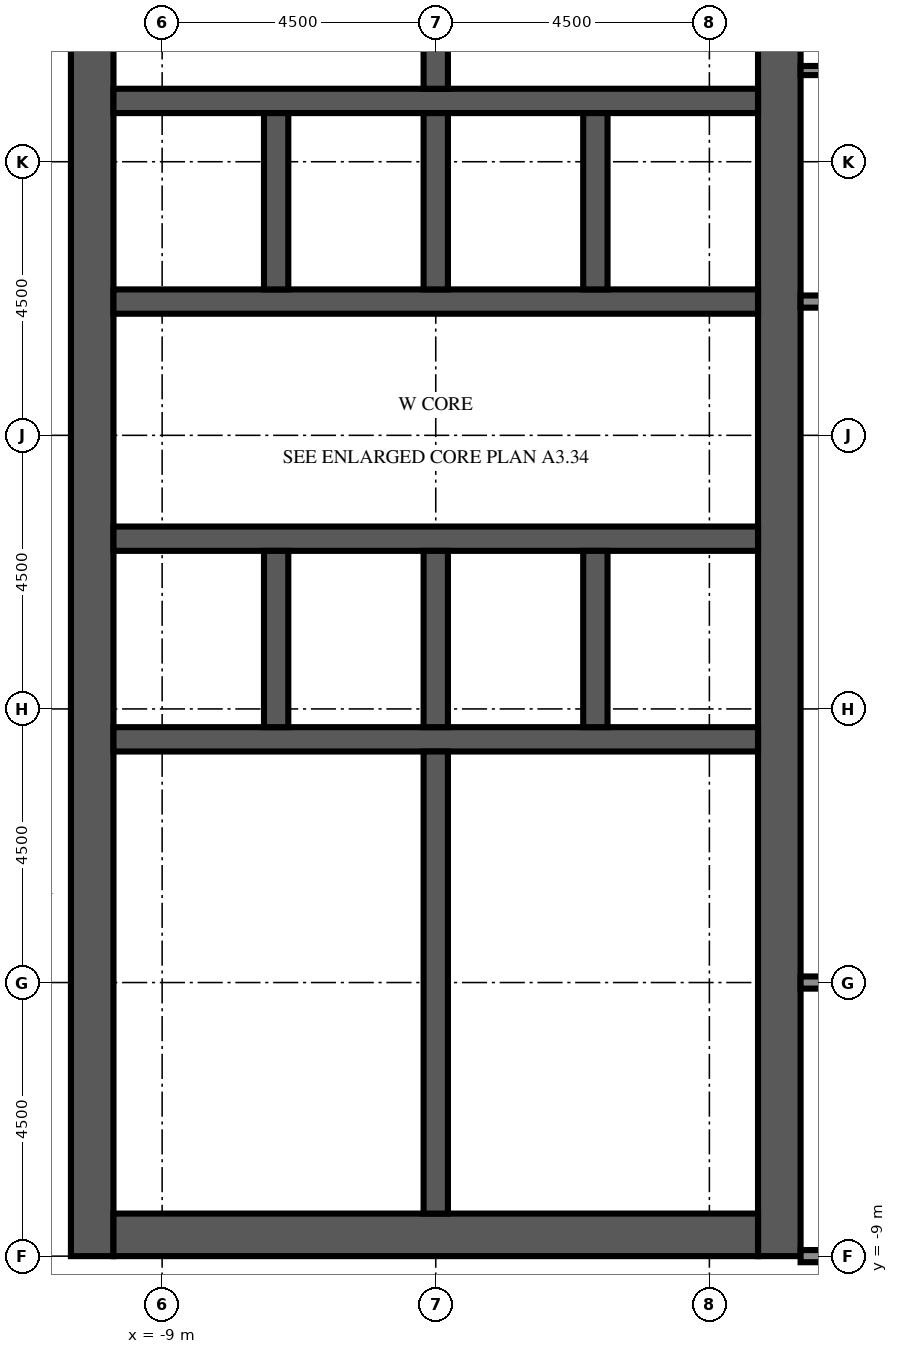
"""IFC4 building model, lengths in metres.
Left out: names, types, materials, properties, quantities, classifications, styles, units other than length and angle.
Written with IfcOpenShell. Run it as: python <this file> out.ifc"""

import sys

from ifc_helpers import new_model, si_unit, direction, frame, frame_2d, origin, place, context, subcontext, project, spatial, rectangle, extrude, element, fill, save


model = new_model("IFC4")
c1 = context("Model", 3, precision=1e-05, world=origin(), true_north=direction((0.0, 1.0)))
c2 = subcontext(c1, "Body", "Model", "MODEL_VIEW")
j1 = project(units=[si_unit("LENGTHUNIT", "METRE"), si_unit("PLANEANGLEUNIT", "RADIAN")], contexts=[c1])
p1 = place(None, origin())
s1 = spatial("IfcSite", under=j1, at=p1, CompositionType="ELEMENT")
p2 = place(p1, origin())
s2 = spatial("IfcBuilding", under=s1, at=p2, CompositionType="ELEMENT")
p3 = place(p2, frame((0.0, 0.0, 226.2)))
s3 = spatial("IfcBuildingStorey", under=s2, at=p3, CompositionType="ELEMENT", Elevation=226.2)
p4 = place(p3, frame((-10.15, -9.0, 0.0), z_axis=(0.0, 0.0, 1.0), x_axis=(0.0, 1.0, 0.0)))
e1 = element("IfcWall", 1, at=p4, inside=s3, PredefinedType="SHEAR", context=c2, shape_type="SweptSolid", body=[
    extrude(rectangle(XDim=27.5, YDim=0.7, at=frame_2d((13.75, 0.0))), origin(), (0.0, 0.0, 1.0), 5.4),
])
p5 = place(p4, frame((12.55, 0.0, 0.0)))
e2 = element("IfcOpeningElement", 2, at=p5, cuts=e1, PredefinedType="OPENING", context=c2, shape_type="SweptSolid", body=[
    extrude(rectangle(XDim=2.4, YDim=2.4, at=frame_2d((1.2, 1.2))), frame((0.0, 0.36, 0.0), z_axis=(0.0, -1.0, 0.0), x_axis=(1.0, 0.0, 0.0)), (0.0, 0.0, 1.0), 0.72),
])
p6 = place(p4, frame((6.825, 0.0, 0.0)))
e3 = element("IfcOpeningElement", 3, at=p6, cuts=e1, PredefinedType="OPENING", context=c2, shape_type="SweptSolid", body=[
    extrude(rectangle(XDim=1.2, YDim=2.1, at=frame_2d((0.6, 1.05))), frame((0.0, 0.36, 0.0), z_axis=(0.0, -1.0, 0.0), x_axis=(1.0, 0.0, 0.0)), (0.0, 0.0, 1.0), 0.72),
])
p7 = place(p4, frame((19.475, 0.0, 0.0)))
e4 = element("IfcOpeningElement", 4, at=p7, cuts=e1, PredefinedType="OPENING", context=c2, shape_type="SweptSolid", body=[
    extrude(rectangle(XDim=1.2, YDim=2.1, at=frame_2d((0.6, 1.05))), frame((0.0, 0.36, 0.0), z_axis=(0.0, -1.0, 0.0), x_axis=(1.0, 0.0, 0.0)), (0.0, 0.0, 1.0), 0.72),
])
p8 = place(p3, frame((1.15, -9.0, 0.0), z_axis=(0.0, 0.0, 1.0), x_axis=(0.0, 1.0, 0.0)))
e5 = element("IfcWall", 5, at=p8, inside=s3, PredefinedType="SHEAR", context=c2, shape_type="SweptSolid", body=[
    extrude(rectangle(XDim=27.5, YDim=0.7, at=frame_2d((13.75, 0.0))), origin(), (0.0, 0.0, 1.0), 5.4),
])
p9 = place(p8, frame((12.55, 0.0, 0.0)))
e6 = element("IfcOpeningElement", 6, at=p9, cuts=e5, PredefinedType="OPENING", context=c2, shape_type="SweptSolid", body=[
    extrude(rectangle(XDim=2.4, YDim=2.4, at=frame_2d((1.2, 1.2))), frame((0.0, 0.36, 0.0), z_axis=(0.0, -1.0, 0.0), x_axis=(1.0, 0.0, 0.0)), (0.0, 0.0, 1.0), 0.72),
])
p10 = place(p8, frame((5.46, 0.0, 0.0)))
e7 = element("IfcOpeningElement", 7, at=p10, cuts=e5, PredefinedType="OPENING", context=c2, shape_type="SweptSolid", body=[
    extrude(rectangle(XDim=0.968, YDim=2.1, at=frame_2d((0.484, 1.05))), frame((0.0, 0.36, 0.0), z_axis=(0.0, -1.0, 0.0), x_axis=(1.0, 0.0, 0.0)), (0.0, 0.0, 1.0), 0.72),
])
p11 = place(p8, frame((23.54, 0.0, 0.0)))
e8 = element("IfcOpeningElement", 8, at=p11, cuts=e5, PredefinedType="OPENING", context=c2, shape_type="SweptSolid", body=[
    extrude(rectangle(XDim=1.2, YDim=2.1, at=frame_2d((0.6, 1.05))), frame((0.0, 0.36, 0.0), z_axis=(0.0, -1.0, 0.0), x_axis=(1.0, 0.0, 0.0)), (0.0, 0.0, 1.0), 0.72),
])
p12 = place(p3, frame((-9.8, -8.65, 0.0), z_axis=(0.0, 0.0, 1.0), x_axis=(1.0, 0.0, 0.0)))
e9 = element("IfcWall", 9, at=p12, inside=s3, PredefinedType="SHEAR", context=c2, shape_type="SweptSolid", body=[
    extrude(rectangle(XDim=10.6, YDim=0.7, at=frame_2d((5.3, 0.0))), origin(), (0.0, 0.0, 1.0), 5.4),
])
p13 = place(p3, frame((-9.8, -0.5, 0.0), z_axis=(0.0, 0.0, 1.0), x_axis=(1.0, 0.0, 0.0)))
e10 = element("IfcWall", 10, at=p13, inside=s3, PredefinedType="SHEAR", context=c2, shape_type="SweptSolid", body=[
    extrude(rectangle(XDim=10.6, YDim=0.4, at=frame_2d((5.3, 0.0))), origin(), (0.0, 0.0, 1.0), 5.4),
])
p14 = place(p3, frame((-9.8, 2.8, 0.0), z_axis=(0.0, 0.0, 1.0), x_axis=(1.0, 0.0, 0.0)))
e11 = element("IfcWall", 11, at=p14, inside=s3, PredefinedType="SHEAR", context=c2, shape_type="SweptSolid", body=[
    extrude(rectangle(XDim=10.6, YDim=0.4, at=frame_2d((5.3, 0.0))), origin(), (0.0, 0.0, 1.0), 5.4),
])
p15 = place(p14, frame((0.688, 0.0, 0.0)))
e12 = element("IfcOpeningElement", 12, at=p15, cuts=e11, PredefinedType="OPENING", context=c2, shape_type="SweptSolid", body=[
    extrude(rectangle(XDim=1.1, YDim=2.1, at=frame_2d((0.55, 1.05))), frame((0.0, 0.21, 0.0), z_axis=(0.0, -1.0, 0.0), x_axis=(1.0, 0.0, 0.0)), (0.0, 0.0, 1.0), 0.42),
])
p16 = place(p14, frame((3.438, 0.0, 0.0)))
e13 = element("IfcOpeningElement", 13, at=p16, cuts=e11, PredefinedType="OPENING", context=c2, shape_type="SweptSolid", body=[
    extrude(rectangle(XDim=1.1, YDim=2.1, at=frame_2d((0.55, 1.05))), frame((0.0, 0.21, 0.0), z_axis=(0.0, -1.0, 0.0), x_axis=(1.0, 0.0, 0.0)), (0.0, 0.0, 1.0), 0.42),
])
p17 = place(p14, frame((6.113, 0.0, 0.0)))
e14 = element("IfcOpeningElement", 14, at=p17, cuts=e11, PredefinedType="OPENING", context=c2, shape_type="SweptSolid", body=[
    extrude(rectangle(XDim=1.0, YDim=2.1, at=frame_2d((0.5, 1.05))), frame((0.0, 0.21, 0.0), z_axis=(0.0, -1.0, 0.0), x_axis=(1.0, 0.0, 0.0)), (0.0, 0.0, 1.0), 0.42),
])
p18 = place(p14, frame((8.863, 0.0, 0.0)))
e15 = element("IfcOpeningElement", 15, at=p18, cuts=e11, PredefinedType="OPENING", context=c2, shape_type="SweptSolid", body=[
    extrude(rectangle(XDim=1.0, YDim=2.1, at=frame_2d((0.5, 1.05))), frame((0.0, 0.21, 0.0), z_axis=(0.0, -1.0, 0.0), x_axis=(1.0, 0.0, 0.0)), (0.0, 0.0, 1.0), 0.42),
])
p19 = place(p3, frame((-9.8, 6.7, 0.0), z_axis=(0.0, 0.0, 1.0), x_axis=(1.0, 0.0, 0.0)))
e16 = element("IfcWall", 16, at=p19, inside=s3, PredefinedType="SHEAR", context=c2, shape_type="SweptSolid", body=[
    extrude(rectangle(XDim=10.6, YDim=0.4, at=frame_2d((5.3, 0.0))), origin(), (0.0, 0.0, 1.0), 5.4),
])
p20 = place(p19, frame((3.438, 0.0, 0.0)))
e17 = element("IfcOpeningElement", 17, at=p20, cuts=e16, PredefinedType="OPENING", context=c2, shape_type="SweptSolid", body=[
    extrude(rectangle(XDim=1.1, YDim=2.1, at=frame_2d((0.55, 1.05))), frame((0.0, 0.21, 0.0), z_axis=(0.0, -1.0, 0.0), x_axis=(1.0, 0.0, 0.0)), (0.0, 0.0, 1.0), 0.42),
])
p21 = place(p19, frame((6.062, 0.0, 0.0)))
e18 = element("IfcOpeningElement", 18, at=p21, cuts=e16, PredefinedType="OPENING", context=c2, shape_type="SweptSolid", body=[
    extrude(rectangle(XDim=1.1, YDim=2.1, at=frame_2d((0.55, 1.05))), frame((0.0, 0.21, 0.0), z_axis=(0.0, -1.0, 0.0), x_axis=(1.0, 0.0, 0.0)), (0.0, 0.0, 1.0), 0.42),
])
p22 = place(p19, frame((8.812, 0.0, 0.0)))
e19 = element("IfcOpeningElement", 19, at=p22, cuts=e16, PredefinedType="OPENING", context=c2, shape_type="SweptSolid", body=[
    extrude(rectangle(XDim=1.1, YDim=2.1, at=frame_2d((0.55, 1.05))), frame((0.0, 0.21, 0.0), z_axis=(0.0, -1.0, 0.0), x_axis=(1.0, 0.0, 0.0)), (0.0, 0.0, 1.0), 0.42),
])
p23 = place(p19, frame((0.738, 0.0, 0.0)))
e20 = element("IfcOpeningElement", 20, at=p23, cuts=e16, PredefinedType="OPENING", context=c2, shape_type="SweptSolid", body=[
    extrude(rectangle(XDim=1.0, YDim=2.1, at=frame_2d((0.5, 1.05))), frame((0.0, 0.21, 0.0), z_axis=(0.0, -1.0, 0.0), x_axis=(1.0, 0.0, 0.0)), (0.0, 0.0, 1.0), 0.42),
])
p24 = place(p3, frame((-9.8, 10.0, 0.0), z_axis=(0.0, 0.0, 1.0), x_axis=(1.0, 0.0, 0.0)))
e21 = element("IfcWall", 21, at=p24, inside=s3, PredefinedType="SHEAR", context=c2, shape_type="SweptSolid", body=[
    extrude(rectangle(XDim=10.6, YDim=0.4, at=frame_2d((5.3, 0.0))), origin(), (0.0, 0.0, 1.0), 5.4),
])
for number, where, z_axis, x_axis in (
    (22, (-7.125, -0.3, 0.0), (0.0, 0.0, 1.0), (0.0, 1.0, 0.0)),
    (23, (-7.125, 6.9, 0.0), (0.0, 0.0, 1.0), (0.0, 1.0, 0.0)),
    (24, (-4.5, -0.3, 0.0), (0.0, 0.0, 1.0), (0.0, 1.0, 0.0)),
    (25, (-4.5, 6.9, 0.0), (0.0, 0.0, 1.0), (0.0, 1.0, 0.0)),
    (26, (-1.875, -0.3, 0.0), (0.0, 0.0, 1.0), (0.0, 1.0, 0.0)),
    (27, (-1.875, 6.9, 0.0), (0.0, 0.0, 1.0), (0.0, 1.0, 0.0)),
):
    element("IfcWall", number, at=place(p3, frame(where, z_axis=z_axis, x_axis=x_axis)), inside=s3, PredefinedType="SHEAR", context=c2, shape_type="SweptSolid", body=[
        extrude(rectangle(XDim=2.9, YDim=0.4, at=frame_2d((1.45, 0.0))), origin(), (0.0, 0.0, 1.0), 5.4),
    ])
for number, where, z_axis, x_axis in (
    (28, (-4.5, -8.3, 0.0), (0.0, 0.0, 1.0), (0.0, 1.0, 0.0)),
    (29, (-4.5, 10.2, 0.0), (0.0, 0.0, 1.0), (0.0, 1.0, 0.0)),
):
    element("IfcWall", number, at=place(p3, frame(where, z_axis=z_axis, x_axis=x_axis)), inside=s3, PredefinedType="SHEAR", context=c2, shape_type="SweptSolid", body=[
        extrude(rectangle(XDim=7.6, YDim=0.4, at=frame_2d((3.8, 0.0))), origin(), (0.0, 0.0, 1.0), 5.4),
    ])
p25 = place(p3, frame((-1.75, -3.74, 0.0), z_axis=(0.0, 0.0, 1.0), x_axis=(1.0, 0.0, 0.0)))
e30 = element("IfcWall", 30, at=p25, inside=s3, PredefinedType="PARTITIONING", context=c2, shape_type="SweptSolid", body=[
    extrude(rectangle(XDim=2.55, YDim=0.1, at=frame_2d((1.275, 0.0))), origin(), (0.0, 0.0, 1.0), 4.95),
])
p26 = place(p25, frame((0.775, 0.0, 0.0)))
e31 = element("IfcOpeningElement", 31, at=p26, cuts=e30, PredefinedType="OPENING", context=c2, shape_type="SweptSolid", body=[
    extrude(rectangle(XDim=1.0, YDim=2.1, at=frame_2d((0.5, 1.05))), frame((0.0, 0.06, 0.0), z_axis=(0.0, -1.0, 0.0), x_axis=(1.0, 0.0, 0.0)), (0.0, 0.0, 1.0), 0.12),
])
p27 = place(p3, frame((-4.3, -3.74, 0.0), z_axis=(0.0, 0.0, 1.0), x_axis=(1.0, 0.0, 0.0)))
e32 = element("IfcWall", 32, at=p27, inside=s3, PredefinedType="PARTITIONING", context=c2, shape_type="SweptSolid", body=[
    extrude(rectangle(XDim=2.55, YDim=0.1, at=frame_2d((1.275, 0.0))), origin(), (0.0, 0.0, 1.0), 4.95),
])
p28 = place(p27, frame((0.775, 0.0, 0.0)))
e33 = element("IfcOpeningElement", 33, at=p28, cuts=e32, PredefinedType="OPENING", context=c2, shape_type="SweptSolid", body=[
    extrude(rectangle(XDim=1.0, YDim=2.1, at=frame_2d((0.5, 1.05))), frame((0.0, 0.06, 0.0), z_axis=(0.0, -1.0, 0.0), x_axis=(1.0, 0.0, 0.0)), (0.0, 0.0, 1.0), 0.12),
])
p29 = place(p3, frame((-1.75, -2.372, 0.0), z_axis=(0.0, 0.0, 1.0), x_axis=(1.0, 0.0, 0.0)))
e34 = element("IfcWall", 34, at=p29, inside=s3, PredefinedType="PARTITIONING", context=c2, shape_type="SweptSolid", body=[
    extrude(rectangle(XDim=2.55, YDim=0.1, at=frame_2d((1.275, 0.0))), origin(), (0.0, 0.0, 1.0), 4.95),
])
p30 = place(p29, frame((0.775, 0.0, 0.0)))
e35 = element("IfcOpeningElement", 35, at=p30, cuts=e34, PredefinedType="OPENING", context=c2, shape_type="SweptSolid", body=[
    extrude(rectangle(XDim=1.0, YDim=2.1, at=frame_2d((0.5, 1.05))), frame((0.0, 0.06, 0.0), z_axis=(0.0, -1.0, 0.0), x_axis=(1.0, 0.0, 0.0)), (0.0, 0.0, 1.0), 0.12),
])
p31 = place(p3, frame((-4.3, -2.372, 0.0), z_axis=(0.0, 0.0, 1.0), x_axis=(1.0, 0.0, 0.0)))
e36 = element("IfcWall", 36, at=p31, inside=s3, PredefinedType="PARTITIONING", context=c2, shape_type="SweptSolid", body=[
    extrude(rectangle(XDim=2.55, YDim=0.1, at=frame_2d((1.275, 0.0))), origin(), (0.0, 0.0, 1.0), 4.95),
])
p32 = place(p31, frame((0.775, 0.0, 0.0)))
e37 = element("IfcOpeningElement", 37, at=p32, cuts=e36, PredefinedType="OPENING", context=c2, shape_type="SweptSolid", body=[
    extrude(rectangle(XDim=1.0, YDim=2.1, at=frame_2d((0.5, 1.05))), frame((0.0, 0.06, 0.0), z_axis=(0.0, -1.0, 0.0), x_axis=(1.0, 0.0, 0.0)), (0.0, 0.0, 1.0), 0.12),
])
p33 = place(p3, frame((-1.75, -8.3, 0.0), z_axis=(0.0, 0.0, 1.0), x_axis=(0.0, 1.0, 0.0)))
e38 = element("IfcWall", 38, at=p33, inside=s3, PredefinedType="PARTITIONING", context=c2, shape_type="SweptSolid", body=[
    extrude(rectangle(XDim=4.56, YDim=0.1, at=frame_2d((2.28, 0.0))), origin(), (0.0, 0.0, 1.0), 4.95),
])
p34 = place(p3, frame((-1.75, -2.372, 0.0), z_axis=(0.0, 0.0, 1.0), x_axis=(0.0, 1.0, 0.0)))
e39 = element("IfcWall", 39, at=p34, inside=s3, PredefinedType="PARTITIONING", context=c2, shape_type="SweptSolid", body=[
    extrude(rectangle(XDim=1.672, YDim=0.1, at=frame_2d((0.836, 0.0))), origin(), (0.0, 0.0, 1.0), 4.95),
])
p35 = place(p3, frame((1.5, -9.0, 0.0), z_axis=(0.0, 0.0, 1.0), x_axis=(1.0, 0.0, 0.0)))
e40 = element("IfcWall", 40, at=p35, inside=s3, PredefinedType="PARTITIONING", context=c2, shape_type="SweptSolid", body=[
    extrude(rectangle(XDim=4.5, YDim=0.2, at=frame_2d((2.25, 0.0))), origin(), (0.0, 0.0, 1.0), 4.95),
])
p36 = place(p35, frame((2.35, 0.0, 0.0)))
e41 = element("IfcOpeningElement", 41, at=p36, cuts=e40, PredefinedType="OPENING", context=c2, shape_type="SweptSolid", body=[
    extrude(rectangle(XDim=1.0, YDim=2.1, at=frame_2d((0.5, 1.05))), frame((0.0, 0.11, 0.0), z_axis=(0.0, -1.0, 0.0), x_axis=(1.0, 0.0, 0.0)), (0.0, 0.0, 1.0), 0.22),
])
p37 = place(p3, frame((1.5, -4.5, 0.0), z_axis=(0.0, 0.0, 1.0), x_axis=(1.0, 0.0, 0.0)))
e42 = element("IfcWall", 42, at=p37, inside=s3, PredefinedType="PARTITIONING", context=c2, shape_type="SweptSolid", body=[
    extrude(rectangle(XDim=4.5, YDim=0.2, at=frame_2d((2.25, 0.0))), origin(), (0.0, 0.0, 1.0), 4.95),
])
p38 = place(p3, frame((1.5, 6.7, 0.0), z_axis=(0.0, 0.0, 1.0), x_axis=(1.0, 0.0, 0.0)))
e43 = element("IfcWall", 43, at=p38, inside=s3, PredefinedType="PARTITIONING", context=c2, shape_type="SweptSolid", body=[
    extrude(rectangle(XDim=4.5, YDim=0.2, at=frame_2d((2.25, 0.0))), origin(), (0.0, 0.0, 1.0), 4.95),
])
p39 = place(p38, frame((1.35, 0.0, 0.0)))
e44 = element("IfcOpeningElement", 44, at=p39, cuts=e43, PredefinedType="OPENING", context=c2, shape_type="SweptSolid", body=[
    extrude(rectangle(XDim=1.0, YDim=2.1, at=frame_2d((0.5, 1.05))), frame((0.0, 0.11, 0.0), z_axis=(0.0, -1.0, 0.0), x_axis=(1.0, 0.0, 0.0)), (0.0, 0.0, 1.0), 0.22),
])
p40 = place(p3, frame((1.5, 10.5, 0.0), z_axis=(0.0, 0.0, 1.0), x_axis=(1.0, 0.0, 0.0)))
e45 = element("IfcWall", 45, at=p40, inside=s3, PredefinedType="PARTITIONING", context=c2, shape_type="SweptSolid", body=[
    extrude(rectangle(XDim=4.5, YDim=0.15, at=frame_2d((2.25, 0.0))), origin(), (0.0, 0.0, 1.0), 4.95),
])
p41 = place(p40, frame((1.35, 0.0, 0.0)))
e46 = element("IfcOpeningElement", 46, at=p41, cuts=e45, PredefinedType="OPENING", context=c2, shape_type="SweptSolid", body=[
    extrude(rectangle(XDim=1.0, YDim=2.1, at=frame_2d((0.5, 1.05))), frame((0.0, 0.085, 0.0), z_axis=(0.0, -1.0, 0.0), x_axis=(1.0, 0.0, 0.0)), (0.0, 0.0, 1.0), 0.17),
])
p42 = place(p15, origin())
e47 = element("IfcDoor", 47, at=p42, inside=s3, OperationType="DOUBLE_DOOR_SLIDING", PredefinedType="DOOR", context=c2, shape_type="SweptSolid", body=[
    extrude(rectangle(XDim=1.1, YDim=2.1, at=frame_2d((0.55, 1.05))), frame((0.0, 0.025, 0.0), z_axis=(0.0, -1.0, 0.0), x_axis=(1.0, 0.0, 0.0)), (0.0, 0.0, 1.0), 0.05),
])
fill(e12, e47)
p43 = place(p16, origin())
e48 = element("IfcDoor", 48, at=p43, inside=s3, OperationType="DOUBLE_DOOR_SLIDING", PredefinedType="DOOR", context=c2, shape_type="SweptSolid", body=[
    extrude(rectangle(XDim=1.1, YDim=2.1, at=frame_2d((0.55, 1.05))), frame((0.0, 0.025, 0.0), z_axis=(0.0, -1.0, 0.0), x_axis=(1.0, 0.0, 0.0)), (0.0, 0.0, 1.0), 0.05),
])
fill(e13, e48)
p44 = place(p20, origin())
e49 = element("IfcDoor", 49, at=p44, inside=s3, OperationType="DOUBLE_DOOR_SLIDING", PredefinedType="DOOR", context=c2, shape_type="SweptSolid", body=[
    extrude(rectangle(XDim=1.1, YDim=2.1, at=frame_2d((0.55, 1.05))), frame((0.0, 0.025, 0.0), z_axis=(0.0, -1.0, 0.0), x_axis=(1.0, 0.0, 0.0)), (0.0, 0.0, 1.0), 0.05),
])
fill(e17, e49)
p45 = place(p21, origin())
e50 = element("IfcDoor", 50, at=p45, inside=s3, OperationType="DOUBLE_DOOR_SLIDING", PredefinedType="DOOR", context=c2, shape_type="SweptSolid", body=[
    extrude(rectangle(XDim=1.1, YDim=2.1, at=frame_2d((0.55, 1.05))), frame((0.0, 0.025, 0.0), z_axis=(0.0, -1.0, 0.0), x_axis=(1.0, 0.0, 0.0)), (0.0, 0.0, 1.0), 0.05),
])
fill(e18, e50)
p46 = place(p22, origin())
e51 = element("IfcDoor", 51, at=p46, inside=s3, OperationType="DOUBLE_DOOR_SLIDING", PredefinedType="DOOR", context=c2, shape_type="SweptSolid", body=[
    extrude(rectangle(XDim=1.1, YDim=2.1, at=frame_2d((0.55, 1.05))), frame((0.0, 0.025, 0.0), z_axis=(0.0, -1.0, 0.0), x_axis=(1.0, 0.0, 0.0)), (0.0, 0.0, 1.0), 0.05),
])
fill(e19, e51)
p47 = place(p5, origin())
e52 = element("IfcDoor", 52, at=p47, inside=s3, OperationType="DOUBLE_DOOR_DOUBLE_SWING", PredefinedType="DOOR", context=c2, shape_type="SweptSolid", body=[
    extrude(rectangle(XDim=2.4, YDim=2.4, at=frame_2d((1.2, 1.2))), frame((0.0, 0.025, 0.0), z_axis=(0.0, -1.0, 0.0), x_axis=(1.0, 0.0, 0.0)), (0.0, 0.0, 1.0), 0.05),
])
fill(e2, e52)
p48 = place(p9, origin())
e53 = element("IfcDoor", 53, at=p48, inside=s3, OperationType="DOUBLE_DOOR_DOUBLE_SWING", PredefinedType="DOOR", context=c2, shape_type="SweptSolid", body=[
    extrude(rectangle(XDim=2.4, YDim=2.4, at=frame_2d((1.2, 1.2))), frame((0.0, 0.025, 0.0), z_axis=(0.0, -1.0, 0.0), x_axis=(1.0, 0.0, 0.0)), (0.0, 0.0, 1.0), 0.05),
])
fill(e6, e53)
p49 = place(p6, origin())
e54 = element("IfcDoor", 54, at=p49, inside=s3, OperationType="SINGLE_SWING_LEFT", PredefinedType="DOOR", context=c2, shape_type="SweptSolid", body=[
    extrude(rectangle(XDim=1.2, YDim=2.1, at=frame_2d((0.6, 1.05))), frame((0.0, 0.025, 0.0), z_axis=(0.0, -1.0, 0.0), x_axis=(1.0, 0.0, 0.0)), (0.0, 0.0, 1.0), 0.05),
])
fill(e3, e54)
p50 = place(p7, origin())
e55 = element("IfcDoor", 55, at=p50, inside=s3, OperationType="SINGLE_SWING_LEFT", PredefinedType="DOOR", context=c2, shape_type="SweptSolid", body=[
    extrude(rectangle(XDim=1.2, YDim=2.1, at=frame_2d((0.6, 1.05))), frame((0.0, 0.025, 0.0), z_axis=(0.0, -1.0, 0.0), x_axis=(1.0, 0.0, 0.0)), (0.0, 0.0, 1.0), 0.05),
])
fill(e4, e55)
p51 = place(p17, origin())
e56 = element("IfcDoor", 56, at=p51, inside=s3, OperationType="SINGLE_SWING_LEFT", PredefinedType="DOOR", context=c2, shape_type="SweptSolid", body=[
    extrude(rectangle(XDim=1.0, YDim=2.1, at=frame_2d((0.5, 1.05))), frame((0.0, 0.025, 0.0), z_axis=(0.0, -1.0, 0.0), x_axis=(1.0, 0.0, 0.0)), (0.0, 0.0, 1.0), 0.05),
])
fill(e14, e56)
p52 = place(p18, origin())
e57 = element("IfcDoor", 57, at=p52, inside=s3, OperationType="SINGLE_SWING_RIGHT", PredefinedType="DOOR", context=c2, shape_type="SweptSolid", body=[
    extrude(rectangle(XDim=1.0, YDim=2.1, at=frame_2d((0.5, 1.05))), frame((0.0, 0.025, 0.0), z_axis=(0.0, -1.0, 0.0), x_axis=(1.0, 0.0, 0.0)), (0.0, 0.0, 1.0), 0.05),
])
fill(e15, e57)
p53 = place(p23, origin())
e58 = element("IfcDoor", 58, at=p53, inside=s3, OperationType="SINGLE_SWING_LEFT", PredefinedType="DOOR", context=c2, shape_type="SweptSolid", body=[
    extrude(rectangle(XDim=1.0, YDim=2.1, at=frame_2d((0.5, 1.05))), frame((0.0, 0.025, 0.0), z_axis=(0.0, -1.0, 0.0), x_axis=(1.0, 0.0, 0.0)), (0.0, 0.0, 1.0), 0.05),
])
fill(e20, e58)
p54 = place(p10, origin())
e59 = element("IfcDoor", 59, at=p54, inside=s3, OperationType="SINGLE_SWING_LEFT", PredefinedType="DOOR", context=c2, shape_type="SweptSolid", body=[
    extrude(rectangle(XDim=0.968, YDim=2.1, at=frame_2d((0.484, 1.05))), frame((0.0, 0.325, 0.0), z_axis=(0.0, -1.0, 0.0), x_axis=(1.0, 0.0, 0.0)), (0.0, 0.0, 1.0), 0.05),
])
fill(e7, e59)
p55 = place(p26, origin())
e60 = element("IfcDoor", 60, at=p55, inside=s3, OperationType="SINGLE_SWING_RIGHT", PredefinedType="DOOR", context=c2, shape_type="SweptSolid", body=[
    extrude(rectangle(XDim=1.0, YDim=2.1, at=frame_2d((0.5, 1.05))), frame((0.0, 0.025, 0.0), z_axis=(0.0, -1.0, 0.0), x_axis=(1.0, 0.0, 0.0)), (0.0, 0.0, 1.0), 0.05),
])
fill(e31, e60)
p56 = place(p28, origin())
e61 = element("IfcDoor", 61, at=p56, inside=s3, OperationType="SINGLE_SWING_LEFT", PredefinedType="DOOR", context=c2, shape_type="SweptSolid", body=[
    extrude(rectangle(XDim=1.0, YDim=2.1, at=frame_2d((0.5, 1.05))), frame((0.0, 0.025, 0.0), z_axis=(0.0, -1.0, 0.0), x_axis=(1.0, 0.0, 0.0)), (0.0, 0.0, 1.0), 0.05),
])
fill(e33, e61)
p57 = place(p30, origin())
e62 = element("IfcDoor", 62, at=p57, inside=s3, OperationType="SINGLE_SWING_RIGHT", PredefinedType="DOOR", context=c2, shape_type="SweptSolid", body=[
    extrude(rectangle(XDim=1.0, YDim=2.1, at=frame_2d((0.5, 1.05))), frame((0.0, 0.025, 0.0), z_axis=(0.0, -1.0, 0.0), x_axis=(1.0, 0.0, 0.0)), (0.0, 0.0, 1.0), 0.05),
])
fill(e35, e62)
p58 = place(p32, origin())
e63 = element("IfcDoor", 63, at=p58, inside=s3, OperationType="SINGLE_SWING_LEFT", PredefinedType="DOOR", context=c2, shape_type="SweptSolid", body=[
    extrude(rectangle(XDim=1.0, YDim=2.1, at=frame_2d((0.5, 1.05))), frame((0.0, 0.025, 0.0), z_axis=(0.0, -1.0, 0.0), x_axis=(1.0, 0.0, 0.0)), (0.0, 0.0, 1.0), 0.05),
])
fill(e37, e63)
save(model, sys.argv[1])
